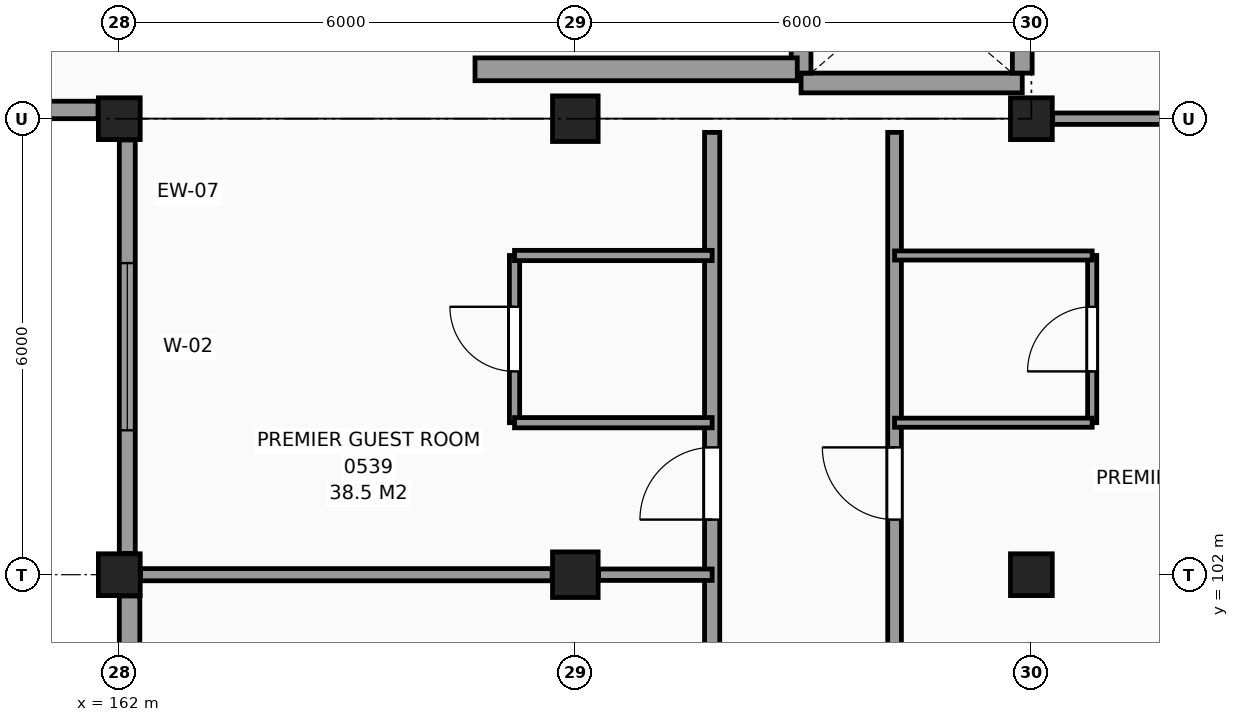
"""IFC4 building model, lengths in metres.
Left out: names, types, materials, properties, quantities, classifications, styles, units other than length and angle.
Written with IfcOpenShell. Run it as: python <this file> out.ifc"""

import sys

from ifc_helpers import new_model, si_unit, direction, frame, frame_2d, origin, origin_2d, place, context, subcontext, project, spatial, rectangle, extrude, element, fill, save


model = new_model("IFC4")
c1 = context("Model", 3, precision=1e-05, world=origin(), true_north=direction((0.0, 1.0)))
c2 = subcontext(c1, "Body", "Model", "MODEL_VIEW")
j1 = project(units=[si_unit("LENGTHUNIT", "METRE"), si_unit("PLANEANGLEUNIT", "RADIAN")], contexts=[c1])
p1 = place(None, origin())
s1 = spatial("IfcSite", under=j1, at=p1, CompositionType="ELEMENT")
p2 = place(p1, origin())
s2 = spatial("IfcBuilding", under=s1, at=p2, CompositionType="ELEMENT")
p3 = place(p2, frame((0.0, 0.0, 24.6)))
s3 = spatial("IfcBuildingStorey", under=s2, at=p3, CompositionType="ELEMENT", Elevation=24.6)
for number, where, z_axis, x_axis in (
    (1, (162.0, 102.0, 0.0), (0.0, 0.0, 1.0), (1.0, 0.0, 0.0)),
    (2, (162.0, 108.0, 0.0), (0.0, 0.0, 1.0), (1.0, 0.0, 0.0)),
):
    element("IfcColumn", number, at=place(p3, frame(where, z_axis=z_axis, x_axis=x_axis)), inside=s3, PredefinedType="COLUMN", context=c2, shape_type="SweptSolid", body=[
        extrude(rectangle(XDim=0.55, YDim=0.55, at=origin_2d()), origin(), (0.0, 0.0, 1.0), 3.6),
    ])
for number, where, z_axis, x_axis in (
    (3, (168.0, 102.0, 0.0), (0.0, 0.0, 1.0), (1.0, 0.0, 0.0)),
    (4, (168.0, 108.0, 0.0), (0.0, 0.0, 1.0), (1.0, 0.0, 0.0)),
):
    element("IfcColumn", number, at=place(p3, frame(where, z_axis=z_axis, x_axis=x_axis)), inside=s3, PredefinedType="COLUMN", context=c2, shape_type="SweptSolid", body=[
        extrude(rectangle(XDim=0.6, YDim=0.6, at=origin_2d()), origin(), (0.0, 0.0, 1.0), 3.6),
    ])
for number, where, z_axis, x_axis in (
    (5, (174.0, 102.0, 0.0), (0.0, 0.0, 1.0), (1.0, 0.0, 0.0)),
    (6, (174.0, 108.0, 0.0), (0.0, 0.0, 1.0), (1.0, 0.0, 0.0)),
):
    element("IfcColumn", number, at=place(p3, frame(where, z_axis=z_axis, x_axis=x_axis)), inside=s3, PredefinedType="COLUMN", context=c2, shape_type="SweptSolid", body=[
        extrude(rectangle(XDim=0.55, YDim=0.55, at=origin_2d()), origin(), (0.0, 0.0, 1.0), 3.6),
    ])
p4 = place(p3, frame((156.305, 108.115, 0.0), z_axis=(0.0, 0.0, 1.0), x_axis=(1.0, 0.0, 0.0)))
e7 = element("IfcWall", 7, at=p4, inside=s3, PredefinedType="SOLIDWALL", context=c2, shape_type="SweptSolid", body=[
    extrude(rectangle(XDim=5.415, YDim=0.23, at=frame_2d((2.708, 0.0))), origin(), (0.0, 0.0, 1.0), 3.38),
])
p5 = place(p3, frame((162.105, 107.72, 0.0), z_axis=(0.0, 0.0, 1.0), x_axis=(0.0, -1.0, 0.0)))
e8 = element("IfcWall", 8, at=p5, inside=s3, PredefinedType="SOLIDWALL", context=c2, shape_type="SweptSolid", body=[
    extrude(rectangle(XDim=5.44, YDim=0.21, at=frame_2d((2.72, 0.0))), origin(), (0.0, 0.0, 1.0), 2.73),
])
p6 = place(p5, frame((1.62, 0.0, 0.8)))
e9 = element("IfcOpeningElement", 9, at=p6, cuts=e8, PredefinedType="OPENING", context=c2, shape_type="SweptSolid", body=[
    extrude(rectangle(XDim=2.2, YDim=1.75, at=frame_2d((1.1, 0.875))), frame((0.0, 0.115, 0.0), z_axis=(0.0, -1.0, 0.0), x_axis=(1.0, 0.0, 0.0)), (0.0, 0.0, 1.0), 0.23),
])
p7 = place(p3, frame((162.135, 101.72, 0.0), z_axis=(0.0, 0.0, 1.0), x_axis=(0.0, -1.0, 0.0)))
e10 = element("IfcWall", 10, at=p7, inside=s3, PredefinedType="SOLIDWALL", context=c2, shape_type="SweptSolid", body=[
    extrude(rectangle(XDim=5.44, YDim=0.27, at=frame_2d((2.72, 0.0))), origin(), (0.0, 0.0, 1.0), 2.73),
])
p8 = place(p7, frame((1.62, 0.0, 0.8)))
e11 = element("IfcOpeningElement", 11, at=p8, cuts=e10, PredefinedType="OPENING", context=c2, shape_type="SweptSolid", body=[
    extrude(rectangle(XDim=2.2, YDim=1.75, at=frame_2d((1.1, 0.875))), frame((0.0, 0.145, 0.0), z_axis=(0.0, -1.0, 0.0), x_axis=(1.0, 0.0, 0.0)), (0.0, 0.0, 1.0), 0.29),
])
p9 = place(p3, frame((170.97, 108.47, 0.0), z_axis=(0.0, 0.0, 1.0), x_axis=(1.0, 0.0, 0.0)))
e12 = element("IfcWall", 12, at=p9, inside=s3, PredefinedType="SHEAR", context=c2, shape_type="SweptSolid", body=[
    extrude(rectangle(XDim=2.91, YDim=0.26, at=frame_2d((1.455, 0.0))), origin(), (0.0, 0.0, 1.0), 3.6),
])
p10 = place(p3, frame((173.88, 108.6, 0.0), z_axis=(0.0, 0.0, 1.0), x_axis=(0.0, 1.0, 0.0)))
e13 = element("IfcWall", 13, at=p10, inside=s3, PredefinedType="SHEAR", context=c2, shape_type="SweptSolid", body=[
    extrude(rectangle(XDim=2.25, YDim=0.26, at=frame_2d((1.125, 0.0))), origin(), (0.0, 0.0, 1.0), 3.6),
])
p11 = place(p3, frame((170.97, 108.6, 0.0), z_axis=(0.0, 0.0, 1.0), x_axis=(0.0, 1.0, 0.0)))
e14 = element("IfcWall", 14, at=p11, inside=s3, PredefinedType="SHEAR", context=c2, shape_type="SweptSolid", body=[
    extrude(rectangle(XDim=2.25, YDim=0.26, at=frame_2d((1.125, 0.0))), origin(), (0.0, 0.0, 1.0), 3.6),
])
p12 = place(p11, frame((0.575, 0.0, 0.0)))
e15 = element("IfcOpeningElement", 15, at=p12, cuts=e14, PredefinedType="OPENING", context=c2, shape_type="SweptSolid", body=[
    extrude(rectangle(XDim=1.1, YDim=2.2, at=frame_2d((0.55, 1.1))), frame((0.0, 0.14, 0.0), z_axis=(0.0, -1.0, 0.0), x_axis=(1.0, 0.0, 0.0)), (0.0, 0.0, 1.0), 0.28),
])
p13 = place(p3, frame((166.68, 108.65, 0.0), z_axis=(0.0, 0.0, 1.0), x_axis=(1.0, 0.0, 0.0)))
e16 = element("IfcWall", 16, at=p13, inside=s3, PredefinedType="SHEAR", context=c2, shape_type="SweptSolid", body=[
    extrude(rectangle(XDim=4.24, YDim=0.3, at=frame_2d((2.12, 0.0))), origin(), (0.0, 0.0, 1.0), 3.6),
])
p14 = place(p3, frame((167.2, 104.0, 0.0), z_axis=(0.0, 0.0, 1.0), x_axis=(0.0, 1.0, 0.0)))
e17 = element("IfcWall", 17, at=p14, inside=s3, PredefinedType="PARTITIONING", context=c2, shape_type="SweptSolid", body=[
    extrude(rectangle(XDim=2.2, YDim=0.135, at=frame_2d((1.1, 0.0))), origin(), (0.0, 0.0, 1.0), 3.38),
])
p15 = place(p14, frame((0.675, 0.0, 0.0)))
e18 = element("IfcOpeningElement", 18, at=p15, cuts=e17, PredefinedType="OPENING", context=c2, shape_type="SweptSolid", body=[
    extrude(rectangle(XDim=0.85, YDim=2.1, at=frame_2d((0.425, 1.05))), frame((0.0, 0.078, 0.0), z_axis=(0.0, -1.0, 0.0), x_axis=(1.0, 0.0, 0.0)), (0.0, 0.0, 1.0), 0.155),
])
p16 = place(p3, frame((169.8, 42.215, 0.0), z_axis=(0.0, 0.0, 1.0), x_axis=(0.0, 1.0, 0.0)))
e19 = element("IfcWall", 19, at=p16, inside=s3, PredefinedType="PARTITIONING", context=c2, shape_type="SweptSolid", body=[
    extrude(rectangle(XDim=65.605, YDim=0.2, at=frame_2d((32.802, 0.0))), origin(), (0.0, 0.0, 1.0), 3.38),
])
p17 = place(p16, frame((50.185, 0.0, 0.0)))
e20 = element("IfcOpeningElement", 20, at=p17, cuts=e19, PredefinedType="OPENING", context=c2, shape_type="SweptSolid", body=[
    extrude(rectangle(XDim=1.2, YDim=2.2, at=frame_2d((0.6, 1.1))), frame((0.0, 0.11, 0.0), z_axis=(0.0, -1.0, 0.0), x_axis=(1.0, 0.0, 0.0)), (0.0, 0.0, 1.0), 0.22),
])
p18 = place(p16, frame((0.46, 0.0, 0.0)))
e21 = element("IfcOpeningElement", 21, at=p18, cuts=e19, PredefinedType="OPENING", context=c2, shape_type="SweptSolid", body=[
    extrude(rectangle(XDim=0.95, YDim=2.1, at=frame_2d((0.475, 1.05))), frame((0.0, 0.11, 0.0), z_axis=(0.0, -1.0, 0.0), x_axis=(1.0, 0.0, 0.0)), (0.0, 0.0, 1.0), 0.22),
])
p19 = place(p16, frame((6.51, 0.0, 0.0)))
e22 = element("IfcOpeningElement", 22, at=p19, cuts=e19, PredefinedType="OPENING", context=c2, shape_type="SweptSolid", body=[
    extrude(rectangle(XDim=0.95, YDim=2.1, at=frame_2d((0.475, 1.05))), frame((0.0, 0.11, 0.0), z_axis=(0.0, -1.0, 0.0), x_axis=(1.0, 0.0, 0.0)), (0.0, 0.0, 1.0), 0.22),
])
p20 = place(p16, frame((12.51, 0.0, 0.0)))
e23 = element("IfcOpeningElement", 23, at=p20, cuts=e19, PredefinedType="OPENING", context=c2, shape_type="SweptSolid", body=[
    extrude(rectangle(XDim=0.95, YDim=2.1, at=frame_2d((0.475, 1.05))), frame((0.0, 0.11, 0.0), z_axis=(0.0, -1.0, 0.0), x_axis=(1.0, 0.0, 0.0)), (0.0, 0.0, 1.0), 0.22),
])
p21 = place(p16, frame((18.51, 0.0, 0.0)))
e24 = element("IfcOpeningElement", 24, at=p21, cuts=e19, PredefinedType="OPENING", context=c2, shape_type="SweptSolid", body=[
    extrude(rectangle(XDim=0.95, YDim=2.1, at=frame_2d((0.475, 1.05))), frame((0.0, 0.11, 0.0), z_axis=(0.0, -1.0, 0.0), x_axis=(1.0, 0.0, 0.0)), (0.0, 0.0, 1.0), 0.22),
])
p22 = place(p16, frame((24.51, 0.0, 0.0)))
e25 = element("IfcOpeningElement", 25, at=p22, cuts=e19, PredefinedType="OPENING", context=c2, shape_type="SweptSolid", body=[
    extrude(rectangle(XDim=0.95, YDim=2.1, at=frame_2d((0.475, 1.05))), frame((0.0, 0.11, 0.0), z_axis=(0.0, -1.0, 0.0), x_axis=(1.0, 0.0, 0.0)), (0.0, 0.0, 1.0), 0.22),
])
p23 = place(p16, frame((30.51, 0.0, 0.0)))
e26 = element("IfcOpeningElement", 26, at=p23, cuts=e19, PredefinedType="OPENING", context=c2, shape_type="SweptSolid", body=[
    extrude(rectangle(XDim=0.95, YDim=2.1, at=frame_2d((0.475, 1.05))), frame((0.0, 0.11, 0.0), z_axis=(0.0, -1.0, 0.0), x_axis=(1.0, 0.0, 0.0)), (0.0, 0.0, 1.0), 0.22),
])
p24 = place(p16, frame((54.51, 0.0, 0.0)))
e27 = element("IfcOpeningElement", 27, at=p24, cuts=e19, PredefinedType="OPENING", context=c2, shape_type="SweptSolid", body=[
    extrude(rectangle(XDim=0.95, YDim=2.1, at=frame_2d((0.475, 1.05))), frame((0.0, 0.11, 0.0), z_axis=(0.0, -1.0, 0.0), x_axis=(1.0, 0.0, 0.0)), (0.0, 0.0, 1.0), 0.22),
])
p25 = place(p16, frame((60.51, 0.0, 0.0)))
e28 = element("IfcOpeningElement", 28, at=p25, cuts=e19, PredefinedType="OPENING", context=c2, shape_type="SweptSolid", body=[
    extrude(rectangle(XDim=0.95, YDim=2.1, at=frame_2d((0.475, 1.05))), frame((0.0, 0.11, 0.0), z_axis=(0.0, -1.0, 0.0), x_axis=(1.0, 0.0, 0.0)), (0.0, 0.0, 1.0), 0.22),
])
p26 = place(p3, frame((172.2, 42.215, 0.0), z_axis=(0.0, 0.0, 1.0), x_axis=(0.0, 1.0, 0.0)))
e29 = element("IfcWall", 29, at=p26, inside=s3, PredefinedType="PARTITIONING", context=c2, shape_type="SweptSolid", body=[
    extrude(rectangle(XDim=65.605, YDim=0.18, at=frame_2d((32.802, 0.0))), origin(), (0.0, 0.0, 1.0), 3.38),
])
p27 = place(p26, frame((7.61, 0.0, 0.0)))
e30 = element("IfcOpeningElement", 30, at=p27, cuts=e29, PredefinedType="OPENING", context=c2, shape_type="SweptSolid", body=[
    extrude(rectangle(XDim=0.95, YDim=2.1, at=frame_2d((0.475, 1.05))), frame((0.0, 0.1, 0.0), z_axis=(0.0, -1.0, 0.0), x_axis=(1.0, 0.0, 0.0)), (0.0, 0.0, 1.0), 0.2),
])
p28 = place(p26, frame((12.11, 0.0, 0.0)))
e31 = element("IfcOpeningElement", 31, at=p28, cuts=e29, PredefinedType="OPENING", context=c2, shape_type="SweptSolid", body=[
    extrude(rectangle(XDim=0.95, YDim=2.1, at=frame_2d((0.475, 1.05))), frame((0.0, 0.1, 0.0), z_axis=(0.0, -1.0, 0.0), x_axis=(1.0, 0.0, 0.0)), (0.0, 0.0, 1.0), 0.2),
])
p29 = place(p26, frame((16.31, 0.0, 0.0)))
e32 = element("IfcOpeningElement", 32, at=p29, cuts=e29, PredefinedType="OPENING", context=c2, shape_type="SweptSolid", body=[
    extrude(rectangle(XDim=0.95, YDim=2.1, at=frame_2d((0.475, 1.05))), frame((0.0, 0.1, 0.0), z_axis=(0.0, -1.0, 0.0), x_axis=(1.0, 0.0, 0.0)), (0.0, 0.0, 1.0), 0.2),
])
p30 = place(p26, frame((25.61, 0.0, 0.0)))
e33 = element("IfcOpeningElement", 33, at=p30, cuts=e29, PredefinedType="OPENING", context=c2, shape_type="SweptSolid", body=[
    extrude(rectangle(XDim=0.95, YDim=2.1, at=frame_2d((0.475, 1.05))), frame((0.0, 0.1, 0.0), z_axis=(0.0, -1.0, 0.0), x_axis=(1.0, 0.0, 0.0)), (0.0, 0.0, 1.0), 0.2),
])
p31 = place(p26, frame((30.11, 0.0, 0.0)))
e34 = element("IfcOpeningElement", 34, at=p31, cuts=e29, PredefinedType="OPENING", context=c2, shape_type="SweptSolid", body=[
    extrude(rectangle(XDim=0.95, YDim=2.1, at=frame_2d((0.475, 1.05))), frame((0.0, 0.1, 0.0), z_axis=(0.0, -1.0, 0.0), x_axis=(1.0, 0.0, 0.0)), (0.0, 0.0, 1.0), 0.2),
])
p32 = place(p26, frame((34.31, 0.0, 0.0)))
e35 = element("IfcOpeningElement", 35, at=p32, cuts=e29, PredefinedType="OPENING", context=c2, shape_type="SweptSolid", body=[
    extrude(rectangle(XDim=0.95, YDim=2.1, at=frame_2d((0.475, 1.05))), frame((0.0, 0.1, 0.0), z_axis=(0.0, -1.0, 0.0), x_axis=(1.0, 0.0, 0.0)), (0.0, 0.0, 1.0), 0.2),
])
p33 = place(p26, frame((36.51, 0.0, 0.0)))
e36 = element("IfcOpeningElement", 36, at=p33, cuts=e29, PredefinedType="OPENING", context=c2, shape_type="SweptSolid", body=[
    extrude(rectangle(XDim=0.95, YDim=2.1, at=frame_2d((0.475, 1.05))), frame((0.0, 0.1, 0.0), z_axis=(0.0, -1.0, 0.0), x_axis=(1.0, 0.0, 0.0)), (0.0, 0.0, 1.0), 0.2),
])
p34 = place(p26, frame((42.51, 0.0, 0.0)))
e37 = element("IfcOpeningElement", 37, at=p34, cuts=e29, PredefinedType="OPENING", context=c2, shape_type="SweptSolid", body=[
    extrude(rectangle(XDim=0.95, YDim=2.1, at=frame_2d((0.475, 1.05))), frame((0.0, 0.1, 0.0), z_axis=(0.0, -1.0, 0.0), x_axis=(1.0, 0.0, 0.0)), (0.0, 0.0, 1.0), 0.2),
])
p35 = place(p26, frame((52.31, 0.0, 0.0)))
e38 = element("IfcOpeningElement", 38, at=p35, cuts=e29, PredefinedType="OPENING", context=c2, shape_type="SweptSolid", body=[
    extrude(rectangle(XDim=0.95, YDim=2.1, at=frame_2d((0.475, 1.05))), frame((0.0, 0.1, 0.0), z_axis=(0.0, -1.0, 0.0), x_axis=(1.0, 0.0, 0.0)), (0.0, 0.0, 1.0), 0.2),
])
p36 = place(p26, frame((54.51, 0.0, 0.0)))
e39 = element("IfcOpeningElement", 39, at=p36, cuts=e29, PredefinedType="OPENING", context=c2, shape_type="SweptSolid", body=[
    extrude(rectangle(XDim=0.95, YDim=2.1, at=frame_2d((0.475, 1.05))), frame((0.0, 0.1, 0.0), z_axis=(0.0, -1.0, 0.0), x_axis=(1.0, 0.0, 0.0)), (0.0, 0.0, 1.0), 0.2),
])
p37 = place(p26, frame((60.51, 0.0, 0.0)))
e40 = element("IfcOpeningElement", 40, at=p37, cuts=e29, PredefinedType="OPENING", context=c2, shape_type="SweptSolid", body=[
    extrude(rectangle(XDim=0.95, YDim=2.1, at=frame_2d((0.475, 1.05))), frame((0.0, 0.1, 0.0), z_axis=(0.0, -1.0, 0.0), x_axis=(1.0, 0.0, 0.0)), (0.0, 0.0, 1.0), 0.2),
])
p38 = place(p3, frame((174.8, 104.0, 0.0), z_axis=(0.0, 0.0, 1.0), x_axis=(0.0, 1.0, 0.0)))
e41 = element("IfcWall", 41, at=p38, inside=s3, PredefinedType="PARTITIONING", context=c2, shape_type="SweptSolid", body=[
    extrude(rectangle(XDim=2.2, YDim=0.12, at=frame_2d((1.1, 0.0))), origin(), (0.0, 0.0, 1.0), 3.38),
])
p39 = place(p38, frame((0.675, 0.0, 0.0)))
e42 = element("IfcOpeningElement", 42, at=p39, cuts=e41, PredefinedType="OPENING", context=c2, shape_type="SweptSolid", body=[
    extrude(rectangle(XDim=0.85, YDim=2.1, at=frame_2d((0.425, 1.05))), frame((0.0, 0.07, 0.0), z_axis=(0.0, -1.0, 0.0), x_axis=(1.0, 0.0, 0.0)), (0.0, 0.0, 1.0), 0.14),
])
p40 = place(p3, frame((162.28, 102.0, 0.0), z_axis=(0.0, 0.0, 1.0), x_axis=(1.0, 0.0, 0.0)))
e43 = element("IfcWall", 43, at=p40, inside=s3, PredefinedType="PARTITIONING", context=c2, shape_type="SweptSolid", body=[
    extrude(rectangle(XDim=5.415, YDim=0.16, at=frame_2d((2.708, 0.0))), origin(), (0.0, 0.0, 1.0), 2.93),
])
p41 = place(p3, frame((168.305, 102.0, 0.0), z_axis=(0.0, 0.0, 1.0), x_axis=(1.0, 0.0, 0.0)))
e44 = element("IfcWall", 44, at=p41, inside=s3, PredefinedType="PARTITIONING", context=c2, shape_type="SweptSolid", body=[
    extrude(rectangle(XDim=1.495, YDim=0.15, at=frame_2d((0.748, 0.0))), origin(), (0.0, 0.0, 1.0), 3.09),
])
p42 = place(p3, frame((167.2, 104.0, 0.0), z_axis=(0.0, 0.0, 1.0), x_axis=(1.0, 0.0, 0.0)))
e45 = element("IfcWall", 45, at=p42, inside=s3, PredefinedType="PARTITIONING", context=c2, shape_type="SweptSolid", body=[
    extrude(rectangle(XDim=2.6, YDim=0.135, at=frame_2d((1.3, 0.0))), origin(), (0.0, 0.0, 1.0), 3.38),
])
p43 = place(p3, frame((172.2, 104.0, 0.0), z_axis=(0.0, 0.0, 1.0), x_axis=(1.0, 0.0, 0.0)))
e46 = element("IfcWall", 46, at=p43, inside=s3, PredefinedType="PARTITIONING", context=c2, shape_type="SweptSolid", body=[
    extrude(rectangle(XDim=2.6, YDim=0.12, at=frame_2d((1.3, 0.0))), origin(), (0.0, 0.0, 1.0), 3.38),
])
p44 = place(p3, frame((167.2, 106.2, 0.0), z_axis=(0.0, 0.0, 1.0), x_axis=(1.0, 0.0, 0.0)))
e47 = element("IfcWall", 47, at=p44, inside=s3, PredefinedType="PARTITIONING", context=c2, shape_type="SweptSolid", body=[
    extrude(rectangle(XDim=2.6, YDim=0.135, at=frame_2d((1.3, 0.0))), origin(), (0.0, 0.0, 1.0), 3.38),
])
p45 = place(p3, frame((172.2, 106.2, 0.0), z_axis=(0.0, 0.0, 1.0), x_axis=(1.0, 0.0, 0.0)))
e48 = element("IfcWall", 48, at=p45, inside=s3, PredefinedType="PARTITIONING", context=c2, shape_type="SweptSolid", body=[
    extrude(rectangle(XDim=2.6, YDim=0.12, at=frame_2d((1.3, 0.0))), origin(), (0.0, 0.0, 1.0), 3.38),
])
p46 = place(p3, frame((174.28, 108.0, 0.0), z_axis=(0.0, 0.0, 1.0), x_axis=(1.0, 0.0, 0.0)))
e49 = element("IfcWall", 49, at=p46, inside=s3, PredefinedType="PARTITIONING", context=c2, shape_type="SweptSolid", body=[
    extrude(rectangle(XDim=5.415, YDim=0.15, at=frame_2d((2.708, 0.0))), origin(), (0.0, 0.0, 1.0), 2.58),
])
p47 = place(p6, origin())
e50 = element("IfcWindow", 50, at=p47, inside=s3, PartitioningType="SINGLE_PANEL", PredefinedType="WINDOW", context=c2, shape_type="SweptSolid", body=[
    extrude(rectangle(XDim=2.2, YDim=1.75, at=frame_2d((1.1, 0.875))), frame((0.0, 0.03, 0.0), z_axis=(0.0, -1.0, 0.0), x_axis=(1.0, 0.0, 0.0)), (0.0, 0.0, 1.0), 0.06),
])
fill(e9, e50)
p48 = place(p39, origin())
e51 = element("IfcDoor", 51, at=p48, inside=s3, OperationType="SINGLE_SWING_LEFT", PredefinedType="DOOR", context=c2, shape_type="SweptSolid", body=[
    extrude(rectangle(XDim=0.85, YDim=2.1, at=frame_2d((0.425, 1.05))), frame((0.0, 0.025, 0.0), z_axis=(0.0, -1.0, 0.0), x_axis=(1.0, 0.0, 0.0)), (0.0, 0.0, 1.0), 0.05),
])
fill(e42, e51)
p49 = place(p37, origin())
e52 = element("IfcDoor", 52, at=p49, inside=s3, OperationType="SINGLE_SWING_RIGHT", PredefinedType="DOOR", context=c2, shape_type="SweptSolid", body=[
    extrude(rectangle(XDim=0.95, YDim=2.1, at=frame_2d((0.475, 1.05))), frame((0.0, 0.025, 0.0), z_axis=(0.0, -1.0, 0.0), x_axis=(1.0, 0.0, 0.0)), (0.0, 0.0, 1.0), 0.05),
])
fill(e40, e52)
p50 = place(p15, origin())
e53 = element("IfcDoor", 53, at=p50, inside=s3, OperationType="SINGLE_SWING_RIGHT", PredefinedType="DOOR", context=c2, shape_type="SweptSolid", body=[
    extrude(rectangle(XDim=0.85, YDim=2.1, at=frame_2d((0.425, 1.05))), frame((0.0, 0.025, 0.0), z_axis=(0.0, -1.0, 0.0), x_axis=(1.0, 0.0, 0.0)), (0.0, 0.0, 1.0), 0.05),
])
fill(e18, e53)
p51 = place(p25, origin())
e54 = element("IfcDoor", 54, at=p51, inside=s3, OperationType="SINGLE_SWING_LEFT", PredefinedType="DOOR", context=c2, shape_type="SweptSolid", body=[
    extrude(rectangle(XDim=0.95, YDim=2.1, at=frame_2d((0.475, 1.05))), frame((0.0, 0.025, 0.0), z_axis=(0.0, -1.0, 0.0), x_axis=(1.0, 0.0, 0.0)), (0.0, 0.0, 1.0), 0.05),
])
fill(e28, e54)
save(model, sys.argv[1])
